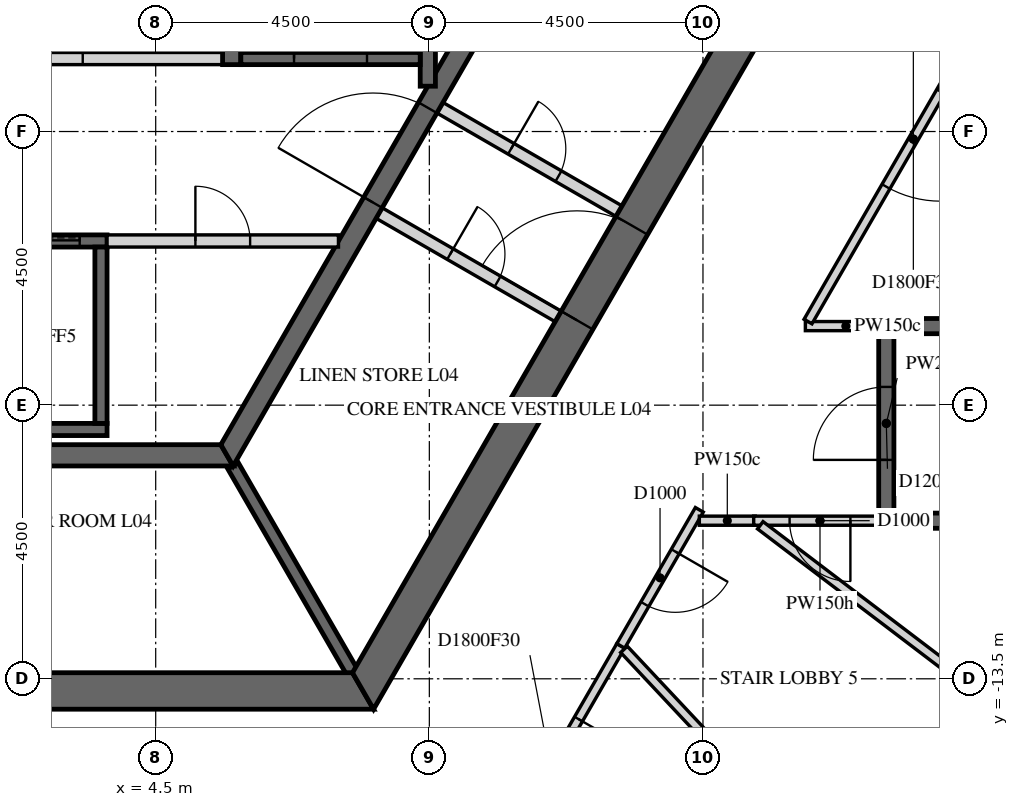
"""IFC4 building model, lengths in metres.
Left out: names, types, materials, properties, quantities, classifications, styles, units other than length and angle.
Written with IfcOpenShell. Run it as: python <this file> out.ifc"""

import sys

from ifc_helpers import new_model, si_unit, direction, frame, frame_2d, origin, place, context, subcontext, project, spatial, polyline, rectangle, outline, extrude, element, fill, save


model = new_model("IFC4")
c1 = context("Model", 3, precision=1e-05, world=origin(), true_north=direction((0.0, 1.0)))
c2 = subcontext(c1, "Body", "Model", "MODEL_VIEW")
j1 = project(units=[si_unit("LENGTHUNIT", "METRE"), si_unit("PLANEANGLEUNIT", "RADIAN")], contexts=[c1])
p1 = place(None, origin())
s1 = spatial("IfcSite", under=j1, at=p1, CompositionType="ELEMENT")
p2 = place(p1, origin())
s2 = spatial("IfcBuilding", under=s1, at=p2, CompositionType="ELEMENT")
p3 = place(p2, frame((0.0, 0.0, 26.0)))
s3 = spatial("IfcBuildingStorey", under=s2, at=p3, CompositionType="ELEMENT", Elevation=26.0)
p4 = place(p3, frame((-7.91, -13.7, -0.25), z_axis=(0.0, 0.0, 1.0), x_axis=(1.0, 0.0, 0.0)))
e1 = element("IfcWall", 1, at=p4, inside=s3, PredefinedType="SHEAR", context=c2, shape_type="SweptSolid", body=[
    extrude(outline(polyline([(-0.173, -0.3), (15.993, -0.3), (15.646, 0.3), (0.173, 0.3), (-0.173, -0.3)])), origin(), (0.0, 0.0, 1.0), 5.45),
])
p5 = place(p4, frame((7.31, 0.0, 0.25)))
e2 = element("IfcOpeningElement", 2, at=p5, cuts=e1, PredefinedType="OPENING", context=c2, shape_type="SweptSolid", body=[
    extrude(rectangle(XDim=1.2, YDim=2.4, at=frame_2d((0.6, 1.2))), frame((0.0, 0.31, 0.0), z_axis=(0.0, -1.0, 0.0), x_axis=(1.0, 0.0, 0.0)), (0.0, 0.0, 1.0), 0.62),
])
p6 = place(p3, frame((7.91, -13.7, -0.25), z_axis=(0.0, 0.0, 1.0), x_axis=(0.499999880136, 0.866025472988, 0.0)))
e3 = element("IfcWall", 3, at=p6, inside=s3, PredefinedType="SHEAR", context=c2, shape_type="SweptSolid", body=[
    extrude(outline(polyline([(-0.173, -0.3), (15.993, -0.3), (15.646, 0.3), (0.173, 0.3), (-0.173, -0.3)])), origin(), (0.0, 0.0, 1.0), 5.45),
])
p7 = place(p6, frame((7.039, 0.0, 0.25)))
e4 = element("IfcOpeningElement", 4, at=p7, cuts=e3, PredefinedType="OPENING", context=c2, shape_type="SweptSolid", body=[
    extrude(rectangle(XDim=1.8, YDim=2.4, at=frame_2d((0.9, 1.2))), frame((0.0, 0.31, 0.0), z_axis=(0.0, -1.0, 0.0), x_axis=(1.0, 0.0, 0.0)), (0.0, 0.0, 1.0), 0.62),
])
p8 = place(p3, frame((-5.673, -9.825, -0.25), z_axis=(0.0, 0.0, 1.0), x_axis=(1.0, 0.0, 0.0)))
e5 = element("IfcWall", 5, at=p8, inside=s3, PredefinedType="SHEAR", context=c2, shape_type="SweptSolid", body=[
    extrude(outline(polyline([(-0.101, -0.175), (11.446, -0.175), (11.244, 0.175), (0.101, 0.175), (-0.101, -0.175)])), origin(), (0.0, 0.0, 1.0), 5.45),
])
p9 = place(p3, frame((5.673, -9.825, -0.25), z_axis=(0.0, 0.0, 1.0), x_axis=(0.499995046907, 0.866028263435, 0.0)))
e6 = element("IfcWall", 6, at=p9, inside=s3, PredefinedType="SHEAR", context=c2, shape_type="SweptSolid", body=[
    extrude(outline(polyline([(-0.101, -0.175), (11.446, -0.175), (11.244, 0.175), (0.101, 0.175), (-0.101, -0.175)])), origin(), (0.0, 0.0, 1.0), 5.45),
])
p10 = place(p9, frame((4.801, 0.0, 0.25)))
e7 = element("IfcOpeningElement", 7, at=p10, cuts=e6, PredefinedType="OPENING", context=c2, shape_type="SweptSolid", body=[
    extrude(rectangle(XDim=1.8, YDim=2.4, at=frame_2d((0.9, 1.2))), frame((0.0, 0.185, 0.0), z_axis=(0.0, -1.0, 0.0), x_axis=(1.0, 0.0, 0.0)), (0.0, 0.0, 1.0), 0.37),
])
p11 = place(p3, frame((-5.5, -6.3, -0.25), z_axis=(0.0, 0.0, 1.0), x_axis=(1.0, 0.0, 0.0)))
e8 = element("IfcWall", 8, at=p11, inside=s3, PredefinedType="SHEAR", context=c2, shape_type="SweptSolid", body=[
    extrude(rectangle(XDim=9.2, YDim=0.2, at=frame_2d((4.6, 0.0))), origin(), (0.0, 0.0, 1.0), 5.5),
])
p12 = place(p11, frame((0.45, 0.0, 0.25)))
e9 = element("IfcOpeningElement", 9, at=p12, cuts=e8, PredefinedType="OPENING", context=c2, shape_type="SweptSolid", body=[
    extrude(rectangle(XDim=1.1, YDim=2.1, at=frame_2d((0.55, 1.05))), frame((0.0, 0.11, 0.0), z_axis=(0.0, -1.0, 0.0), x_axis=(1.0, 0.0, 0.0)), (0.0, 0.0, 1.0), 0.22),
])
p13 = place(p11, frame((2.25, 0.0, 0.25)))
e10 = element("IfcOpeningElement", 10, at=p13, cuts=e8, PredefinedType="OPENING", context=c2, shape_type="SweptSolid", body=[
    extrude(rectangle(XDim=1.1, YDim=2.1, at=frame_2d((0.55, 1.05))), frame((0.0, 0.11, 0.0), z_axis=(0.0, -1.0, 0.0), x_axis=(1.0, 0.0, 0.0)), (0.0, 0.0, 1.0), 0.22),
])
p14 = place(p11, frame((4.05, 0.0, 0.25)))
e11 = element("IfcOpeningElement", 11, at=p14, cuts=e8, PredefinedType="OPENING", context=c2, shape_type="SweptSolid", body=[
    extrude(rectangle(XDim=1.1, YDim=2.1, at=frame_2d((0.55, 1.05))), frame((0.0, 0.11, 0.0), z_axis=(0.0, -1.0, 0.0), x_axis=(1.0, 0.0, 0.0)), (0.0, 0.0, 1.0), 0.22),
])
p15 = place(p11, frame((5.85, 0.0, 0.25)))
e12 = element("IfcOpeningElement", 12, at=p15, cuts=e8, PredefinedType="OPENING", context=c2, shape_type="SweptSolid", body=[
    extrude(rectangle(XDim=1.1, YDim=2.1, at=frame_2d((0.55, 1.05))), frame((0.0, 0.11, 0.0), z_axis=(0.0, -1.0, 0.0), x_axis=(1.0, 0.0, 0.0)), (0.0, 0.0, 1.0), 0.22),
])
p16 = place(p11, frame((7.65, 0.0, 0.25)))
e13 = element("IfcOpeningElement", 13, at=p16, cuts=e8, PredefinedType="OPENING", context=c2, shape_type="SweptSolid", body=[
    extrude(rectangle(XDim=1.1, YDim=2.1, at=frame_2d((0.55, 1.05))), frame((0.0, 0.11, 0.0), z_axis=(0.0, -1.0, 0.0), x_axis=(1.0, 0.0, 0.0)), (0.0, 0.0, 1.0), 0.22),
])
p17 = place(p3, frame((-5.5, -9.4, -0.25), z_axis=(0.0, 0.0, 1.0), x_axis=(1.0, 0.0, 0.0)))
e14 = element("IfcWall", 14, at=p17, inside=s3, PredefinedType="SHEAR", context=c2, shape_type="SweptSolid", body=[
    extrude(rectangle(XDim=9.2, YDim=0.2, at=frame_2d((4.6, 0.0))), origin(), (0.0, 0.0, 1.0), 5.5),
])
p18 = place(p3, frame((3.6, -9.3, -0.25), z_axis=(0.0, 0.0, 1.0), x_axis=(0.0, 1.0, 0.0)))
e15 = element("IfcWall", 15, at=p18, inside=s3, PredefinedType="SHEAR", context=c2, shape_type="SweptSolid", body=[
    extrude(rectangle(XDim=2.9, YDim=0.2, at=frame_2d((1.45, 0.0))), origin(), (0.0, 0.0, 1.0), 5.5),
])
p19 = place(p3, frame((0.1, -3.3, 0.0), z_axis=(0.0, 0.0, 1.0), x_axis=(1.0, 0.0, 0.0)))
e16 = element("IfcWall", 16, at=p19, inside=s3, PredefinedType="PARTITIONING", context=c2, shape_type="SweptSolid", body=[
    extrude(rectangle(XDim=5.5, YDim=0.2, at=frame_2d((2.75, 0.0))), origin(), (0.0, 0.0, 1.0), 5.25),
])
p20 = place(p19, frame((2.3, 0.0, 0.0)))
e17 = element("IfcOpeningElement", 17, at=p20, cuts=e16, PredefinedType="OPENING", context=c2, shape_type="SweptSolid", body=[
    extrude(rectangle(XDim=0.9, YDim=2.1, at=frame_2d((0.45, 1.05))), frame((0.0, 0.11, 0.0), z_axis=(0.0, -1.0, 0.0), x_axis=(1.0, 0.0, 0.0)), (0.0, 0.0, 1.0), 0.22),
])
p21 = place(p3, frame((3.7, -6.3, 0.0), z_axis=(0.0, 0.0, 1.0), x_axis=(1.0, 0.0, 0.0)))
e18 = element("IfcWall", 18, at=p21, inside=s3, PredefinedType="PARTITIONING", context=c2, shape_type="SweptSolid", body=[
    extrude(rectangle(XDim=3.806, YDim=0.2, at=frame_2d((1.903, 0.0))), origin(), (0.0, 0.0, 1.0), 5.25),
])
p22 = place(p21, frame((1.453, 0.0, 0.0)))
e19 = element("IfcOpeningElement", 19, at=p22, cuts=e18, PredefinedType="OPENING", context=c2, shape_type="SweptSolid", body=[
    extrude(rectangle(XDim=0.9, YDim=2.1, at=frame_2d((0.45, 1.05))), frame((0.0, 0.11, 0.0), z_axis=(0.0, -1.0, 0.0), x_axis=(1.0, 0.0, 0.0)), (0.0, 0.0, 1.0), 0.22),
])
p23 = place(p3, frame((5.773, -10.0, -0.25), z_axis=(0.0, 0.0, 1.0), x_axis=(0.500038251005, -0.86600331843, 0.0)))
e20 = element("IfcWall", 20, at=p23, inside=s3, PredefinedType="SHEAR", context=c2, shape_type="SweptSolid", body=[
    extrude(rectangle(XDim=3.926, YDim=0.2, at=frame_2d((1.963, 0.0))), origin(), (0.0, 0.0, 1.0), 5.45),
])
p24 = place(p3, frame((9.175, -4.109, 0.0), z_axis=(0.0, 0.0, 1.0), x_axis=(0.865989465428, -0.500062241894, 0.0)))
e21 = element("IfcWall", 21, at=p24, inside=s3, PredefinedType="PARTITIONING", context=c2, shape_type="SweptSolid", body=[
    extrude(rectangle(XDim=3.4, YDim=0.2, at=frame_2d((1.7, 0.0))), origin(), (0.0, 0.0, 1.0), 5.25),
])
p25 = place(p24, frame((1.351, 0.0, 0.0)))
e22 = element("IfcOpeningElement", 22, at=p25, cuts=e21, PredefinedType="OPENING", context=c2, shape_type="SweptSolid", body=[
    extrude(rectangle(XDim=0.9, YDim=2.1, at=frame_2d((0.45, 1.05))), frame((0.0, 0.11, 0.0), z_axis=(0.0, -1.0, 0.0), x_axis=(1.0, 0.0, 0.0)), (0.0, 0.0, 1.0), 0.22),
])
p26 = place(p3, frame((8.175, -5.841, 0.0), z_axis=(0.0, 0.0, 1.0), x_axis=(0.866020560687, -0.500008388397, 0.0)))
e23 = element("IfcWall", 23, at=p26, inside=s3, PredefinedType="PARTITIONING", context=c2, shape_type="SweptSolid", body=[
    extrude(rectangle(XDim=3.4, YDim=0.2, at=frame_2d((1.7, 0.0))), origin(), (0.0, 0.0, 1.0), 5.25),
])
p27 = place(p26, frame((1.35, 0.0, 0.0)))
e24 = element("IfcOpeningElement", 24, at=p27, cuts=e23, PredefinedType="OPENING", context=c2, shape_type="SweptSolid", body=[
    extrude(rectangle(XDim=0.9, YDim=2.1, at=frame_2d((0.45, 1.05))), frame((0.0, 0.11, 0.0), z_axis=(0.0, -1.0, 0.0), x_axis=(1.0, 0.0, 0.0)), (0.0, 0.0, 1.0), 0.22),
])
p28 = place(p3, frame((5.75, -3.4, -0.25), z_axis=(0.0, 0.0, 1.0), x_axis=(0.0, 1.0, 0.0)))
e25 = element("IfcWall", 25, at=p28, inside=s3, PredefinedType="SHEAR", context=c2, shape_type="SweptSolid", body=[
    extrude(rectangle(XDim=6.8, YDim=0.3, at=frame_2d((3.4, 0.0))), origin(), (0.0, 0.0, 1.0), 5.5),
])
p29 = place(p3, frame((8.975, -3.755, -0.25), z_axis=(0.0, 0.0, 1.0), x_axis=(0.0, 1.0, 0.0)))
e26 = element("IfcWall", 26, at=p29, inside=s3, PredefinedType="SHEAR", context=c2, shape_type="SweptSolid", body=[
    extrude(rectangle(XDim=7.51, YDim=0.25, at=frame_2d((3.755, 0.0))), origin(), (0.0, 0.0, 1.0), 5.5),
])
p30 = place(p3, frame((5.9, -3.3, -0.25), z_axis=(0.0, 0.0, 1.0), x_axis=(1.0, 0.0, 0.0)))
e27 = element("IfcWall", 27, at=p30, inside=s3, PredefinedType="SHEAR", context=c2, shape_type="SweptSolid", body=[
    extrude(rectangle(XDim=2.95, YDim=0.2, at=frame_2d((1.475, 0.0))), origin(), (0.0, 0.0, 1.0), 5.5),
])
p31 = place(p30, frame((0.875, 0.0, 0.25)))
e28 = element("IfcOpeningElement", 28, at=p31, cuts=e27, PredefinedType="OPENING", context=c2, shape_type="SweptSolid", body=[
    extrude(rectangle(XDim=1.2, YDim=2.4, at=frame_2d((0.6, 1.2))), frame((0.0, 0.11, 0.0), z_axis=(0.0, -1.0, 0.0), x_axis=(1.0, 0.0, 0.0)), (0.0, 0.0, 1.0), 0.22),
])
p32 = place(p3, frame((12.148, -12.959, 0.0), z_axis=(0.0, 0.0, 1.0), x_axis=(-0.499957811549, -0.866049759928, 0.0)))
e29 = element("IfcWall", 29, at=p32, inside=s3, PredefinedType="PARTITIONING", context=c2, shape_type="SweptSolid", body=[
    extrude(rectangle(XDim=4.58, YDim=0.15, at=frame_2d((2.29, 0.0))), origin(), (0.0, 0.0, 1.0), 5.2),
])
p33 = place(p32, frame((1.39, 0.0, 0.0)))
e30 = element("IfcOpeningElement", 30, at=p33, cuts=e29, PredefinedType="OPENING", context=c2, shape_type="SweptSolid", body=[
    extrude(rectangle(XDim=1.8, YDim=2.1, at=frame_2d((0.9, 1.05))), frame((0.0, 0.085, 0.0), z_axis=(0.0, -1.0, 0.0), x_axis=(1.0, 0.0, 0.0)), (0.0, 0.0, 1.0), 0.17),
])
p34 = place(p3, frame((13.44, -10.721, 0.0), z_axis=(0.0, 0.0, 1.0), x_axis=(-0.499959617396, -0.866048717436, 0.0)))
e31 = element("IfcWall", 31, at=p34, inside=s3, PredefinedType="PARTITIONING", context=c2, shape_type="SweptSolid", body=[
    extrude(rectangle(XDim=2.584, YDim=0.15, at=frame_2d((1.292, 0.0))), origin(), (0.0, 0.0, 1.0), 5.2),
])
p35 = place(p34, frame((0.792, 0.0, 0.0)))
e32 = element("IfcOpeningElement", 32, at=p35, cuts=e31, PredefinedType="OPENING", context=c2, shape_type="SweptSolid", body=[
    extrude(rectangle(XDim=1.0, YDim=2.1, at=frame_2d((0.5, 1.05))), frame((0.0, 0.085, 0.0), z_axis=(0.0, -1.0, 0.0), x_axis=(1.0, 0.0, 0.0)), (0.0, 0.0, 1.0), 0.17),
])
p36 = place(p3, frame((14.36, -10.9, 0.0), z_axis=(0.0, 0.0, 1.0), x_axis=(-1.0, 0.0, 0.0)))
e33 = element("IfcWall", 33, at=p36, inside=s3, PredefinedType="PARTITIONING", context=c2, shape_type="SweptSolid", body=[
    extrude(rectangle(XDim=0.92, YDim=0.15, at=frame_2d((0.46, 0.0))), origin(), (0.0, 0.0, 1.0), 5.2),
])
p37 = place(p3, frame((15.184, -7.7, 0.0), z_axis=(0.0, 0.0, 1.0), x_axis=(1.0, 0.0, 0.0)))
e34 = element("IfcWall", 34, at=p37, inside=s3, PredefinedType="PARTITIONING", context=c2, shape_type="SweptSolid", body=[
    extrude(rectangle(XDim=1.331, YDim=0.15, at=frame_2d((0.666, 0.0))), origin(), (0.0, 0.0, 1.0), 5.2),
])
p38 = place(p3, frame((18.692, -1.625, 0.0), z_axis=(0.0, 0.0, 1.0), x_axis=(-0.500053906551, -0.865994278585, 0.0)))
e35 = element("IfcWall", 35, at=p38, inside=s3, PredefinedType="PARTITIONING", context=c2, shape_type="SweptSolid", body=[
    extrude(rectangle(XDim=6.928, YDim=0.15, at=frame_2d((3.464, 0.0))), origin(), (0.0, 0.0, 1.0), 5.2),
])
p39 = place(p38, frame((2.564, 0.0, 0.0)))
e36 = element("IfcOpeningElement", 36, at=p39, cuts=e35, PredefinedType="OPENING", context=c2, shape_type="SweptSolid", body=[
    extrude(rectangle(XDim=1.8, YDim=2.1, at=frame_2d((0.9, 1.05))), frame((0.0, 0.085, 0.0), z_axis=(0.0, -1.0, 0.0), x_axis=(1.0, 0.0, 0.0)), (0.0, 0.0, 1.0), 0.17),
])
p40 = place(p3, frame((16.515, -10.9, 0.0), z_axis=(0.0, 0.0, 1.0), x_axis=(-1.0, 0.0, 0.0)))
e37 = element("IfcWall", 37, at=p40, inside=s3, PredefinedType="PARTITIONING", context=c2, shape_type="SweptSolid", body=[
    extrude(rectangle(XDim=2.181, YDim=0.15, at=frame_2d((1.09, 0.0))), origin(), (0.0, 0.0, 1.0), 4.273),
])
p41 = place(p40, frame((0.591, 0.0, 0.0)))
e38 = element("IfcOpeningElement", 38, at=p41, cuts=e37, PredefinedType="OPENING", context=c2, shape_type="SweptSolid", body=[
    extrude(rectangle(XDim=1.0, YDim=2.1, at=frame_2d((0.5, 1.05))), frame((0.0, 0.085, 0.0), z_axis=(0.0, -1.0, 0.0), x_axis=(1.0, 0.0, 0.0)), (0.0, 0.0, 1.0), 0.17),
])
p42 = place(p3, frame((16.515, -10.825, 0.0), z_axis=(0.0, 0.0, 1.0), x_axis=(0.0, 1.0, 0.0)))
e39 = element("IfcWall", 39, at=p42, inside=s3, PredefinedType="PARTITIONING", context=c2, shape_type="SweptSolid", body=[
    extrude(rectangle(XDim=3.05, YDim=0.25, at=frame_2d((1.525, 0.0))), origin(), (0.0, 0.0, 1.0), 5.2),
])
p43 = place(p42, frame((0.925, 0.0, 0.0)))
e40 = element("IfcOpeningElement", 40, at=p43, cuts=e39, PredefinedType="OPENING", context=c2, shape_type="SweptSolid", body=[
    extrude(rectangle(XDim=1.2, YDim=2.1, at=frame_2d((0.6, 1.05))), frame((0.0, 0.135, 0.0), z_axis=(0.0, -1.0, 0.0), x_axis=(1.0, 0.0, 0.0)), (0.0, 0.0, 1.0), 0.27),
])
p44 = place(p3, frame((16.64, -7.7, 0.0), z_axis=(0.0, 0.0, 1.0), x_axis=(1.0, 0.0, 0.0)))
e41 = element("IfcWall", 41, at=p44, inside=s3, PredefinedType="PARTITIONING", context=c2, shape_type="SweptSolid", body=[
    extrude(rectangle(XDim=10.145, YDim=0.25, at=frame_2d((5.073, 0.0))), origin(), (0.0, 0.0, 1.0), 4.273),
])
p45 = place(p3, frame((20.795, -22.182, 0.0), z_axis=(0.0, 0.0, 1.0), x_axis=(-0.683955995382, 0.729523266511, 0.0)))
e42 = element("IfcWall", 42, at=p45, inside=s3, PredefinedType="PARTITIONING", context=c2, shape_type="SweptSolid", body=[
    extrude(rectangle(XDim=12.564, YDim=0.15, at=frame_2d((6.282, 0.0))), origin(), (0.0, 0.0, 1.0), 4.273),
])
p46 = place(p3, frame((20.856, -10.9, 0.0), z_axis=(0.0, 0.0, 1.0), x_axis=(-1.0, 0.0, 0.0)))
e43 = element("IfcWall", 43, at=p46, inside=s3, PredefinedType="PARTITIONING", context=c2, shape_type="SweptSolid", body=[
    extrude(rectangle(XDim=4.216, YDim=0.25, at=frame_2d((2.108, 0.0))), origin(), (0.0, 0.0, 1.0), 5.2),
])
p47 = place(p3, frame((23.355, -17.748, 0.0), z_axis=(0.0, 0.0, 1.0), x_axis=(-0.796181106224, 0.605058382383, 0.0)))
e44 = element("IfcWall", 44, at=p47, inside=s3, PredefinedType="PARTITIONING", context=c2, shape_type="SweptSolid", body=[
    extrude(rectangle(XDim=11.194, YDim=0.15, at=frame_2d((5.597, 0.0))), origin(), (0.0, 0.0, 1.0), 5.2),
])
p48 = place(p7, origin())
e45 = element("IfcDoor", 45, at=p48, inside=s3, OperationType="DOUBLE_DOOR_SINGLE_SWING", PredefinedType="DOOR", context=c2, shape_type="SweptSolid", body=[
    extrude(rectangle(XDim=1.8, YDim=2.4, at=frame_2d((0.9, 1.2))), frame((0.0, 0.025, 0.0), z_axis=(0.0, -1.0, 0.0), x_axis=(1.0, 0.0, 0.0)), (0.0, 0.0, 1.0), 0.05),
])
fill(e4, e45)
p49 = place(p10, origin())
e46 = element("IfcDoor", 46, at=p49, inside=s3, OperationType="DOUBLE_DOOR_SINGLE_SWING", PredefinedType="DOOR", context=c2, shape_type="SweptSolid", body=[
    extrude(rectangle(XDim=1.8, YDim=2.4, at=frame_2d((0.9, 1.2))), frame((0.0, 0.025, 0.0), z_axis=(0.0, -1.0, 0.0), x_axis=(1.0, 0.0, 0.0)), (0.0, 0.0, 1.0), 0.05),
])
fill(e7, e46)
p50 = place(p20, origin())
e47 = element("IfcDoor", 47, at=p50, inside=s3, OperationType="SINGLE_SWING_LEFT", PredefinedType="DOOR", context=c2, shape_type="SweptSolid", body=[
    extrude(rectangle(XDim=0.9, YDim=2.1, at=frame_2d((0.45, 1.05))), frame((0.0, 0.025, 0.0), z_axis=(0.0, -1.0, 0.0), x_axis=(1.0, 0.0, 0.0)), (0.0, 0.0, 1.0), 0.05),
])
fill(e17, e47)
p51 = place(p22, origin())
e48 = element("IfcDoor", 48, at=p51, inside=s3, OperationType="SINGLE_SWING_LEFT", PredefinedType="DOOR", context=c2, shape_type="SweptSolid", body=[
    extrude(rectangle(XDim=0.9, YDim=2.1, at=frame_2d((0.45, 1.05))), frame((0.0, 0.025, 0.0), z_axis=(0.0, -1.0, 0.0), x_axis=(1.0, 0.0, 0.0)), (0.0, 0.0, 1.0), 0.05),
])
fill(e19, e48)
p52 = place(p25, origin())
e49 = element("IfcDoor", 49, at=p52, inside=s3, OperationType="SINGLE_SWING_LEFT", PredefinedType="DOOR", context=c2, shape_type="SweptSolid", body=[
    extrude(rectangle(XDim=0.9, YDim=2.1, at=frame_2d((0.45, 1.05))), frame((0.0, 0.025, 0.0), z_axis=(0.0, -1.0, 0.0), x_axis=(1.0, 0.0, 0.0)), (0.0, 0.0, 1.0), 0.05),
])
fill(e22, e49)
p53 = place(p27, origin())
e50 = element("IfcDoor", 50, at=p53, inside=s3, OperationType="SINGLE_SWING_LEFT", PredefinedType="DOOR", context=c2, shape_type="SweptSolid", body=[
    extrude(rectangle(XDim=0.9, YDim=2.1, at=frame_2d((0.45, 1.05))), frame((0.0, 0.025, 0.0), z_axis=(0.0, -1.0, 0.0), x_axis=(1.0, 0.0, 0.0)), (0.0, 0.0, 1.0), 0.05),
])
fill(e24, e50)
p54 = place(p31, origin())
e51 = element("IfcDoor", 51, at=p54, inside=s3, OperationType="SINGLE_SWING_LEFT", PredefinedType="DOOR", context=c2, shape_type="SweptSolid", body=[
    extrude(rectangle(XDim=1.2, YDim=2.4, at=frame_2d((0.6, 1.2))), frame((0.0, 0.025, 0.0), z_axis=(0.0, -1.0, 0.0), x_axis=(1.0, 0.0, 0.0)), (0.0, 0.0, 1.0), 0.05),
])
fill(e28, e51)
p55 = place(p16, origin())
e52 = element("IfcDoor", 52, at=p55, inside=s3, OperationType="SLIDING_TO_LEFT", PredefinedType="DOOR", context=c2, shape_type="SweptSolid", body=[
    extrude(rectangle(XDim=1.1, YDim=2.1, at=frame_2d((0.55, 1.05))), frame((0.0, 0.025, 0.0), z_axis=(0.0, -1.0, 0.0), x_axis=(1.0, 0.0, 0.0)), (0.0, 0.0, 1.0), 0.05),
])
fill(e13, e52)
p56 = place(p33, origin())
e53 = element("IfcDoor", 53, at=p56, inside=s3, OperationType="DOUBLE_DOOR_SINGLE_SWING", PredefinedType="DOOR", context=c2, shape_type="SweptSolid", body=[
    extrude(rectangle(XDim=1.8, YDim=2.1, at=frame_2d((0.9, 1.05))), frame((0.0, 0.025, 0.0), z_axis=(0.0, -1.0, 0.0), x_axis=(1.0, 0.0, 0.0)), (0.0, 0.0, 1.0), 0.05),
])
fill(e30, e53)
p57 = place(p35, origin())
e54 = element("IfcDoor", 54, at=p57, inside=s3, OperationType="SINGLE_SWING_LEFT", PredefinedType="DOOR", context=c2, shape_type="SweptSolid", body=[
    extrude(rectangle(XDim=1.0, YDim=2.1, at=frame_2d((0.5, 1.05))), frame((0.0, 0.025, 0.0), z_axis=(0.0, -1.0, 0.0), x_axis=(1.0, 0.0, 0.0)), (0.0, 0.0, 1.0), 0.05),
])
fill(e32, e54)
p58 = place(p39, origin())
e55 = element("IfcDoor", 55, at=p58, inside=s3, OperationType="DOUBLE_DOOR_SINGLE_SWING", PredefinedType="DOOR", context=c2, shape_type="SweptSolid", body=[
    extrude(rectangle(XDim=1.8, YDim=2.1, at=frame_2d((0.9, 1.05))), frame((0.0, 0.025, 0.0), z_axis=(0.0, -1.0, 0.0), x_axis=(1.0, 0.0, 0.0)), (0.0, 0.0, 1.0), 0.05),
])
fill(e36, e55)
p59 = place(p41, origin())
e56 = element("IfcDoor", 56, at=p59, inside=s3, OperationType="SINGLE_SWING_RIGHT", PredefinedType="DOOR", context=c2, shape_type="SweptSolid", body=[
    extrude(rectangle(XDim=1.0, YDim=2.1, at=frame_2d((0.5, 1.05))), frame((0.0, 0.025, 0.0), z_axis=(0.0, -1.0, 0.0), x_axis=(1.0, 0.0, 0.0)), (0.0, 0.0, 1.0), 0.05),
])
fill(e38, e56)
p60 = place(p43, origin())
e57 = element("IfcDoor", 57, at=p60, inside=s3, OperationType="SINGLE_SWING_LEFT", PredefinedType="DOOR", context=c2, shape_type="SweptSolid", body=[
    extrude(rectangle(XDim=1.2, YDim=2.1, at=frame_2d((0.6, 1.05))), frame((0.0, 0.025, 0.0), z_axis=(0.0, -1.0, 0.0), x_axis=(1.0, 0.0, 0.0)), (0.0, 0.0, 1.0), 0.05),
])
fill(e40, e57)
save(model, sys.argv[1])
